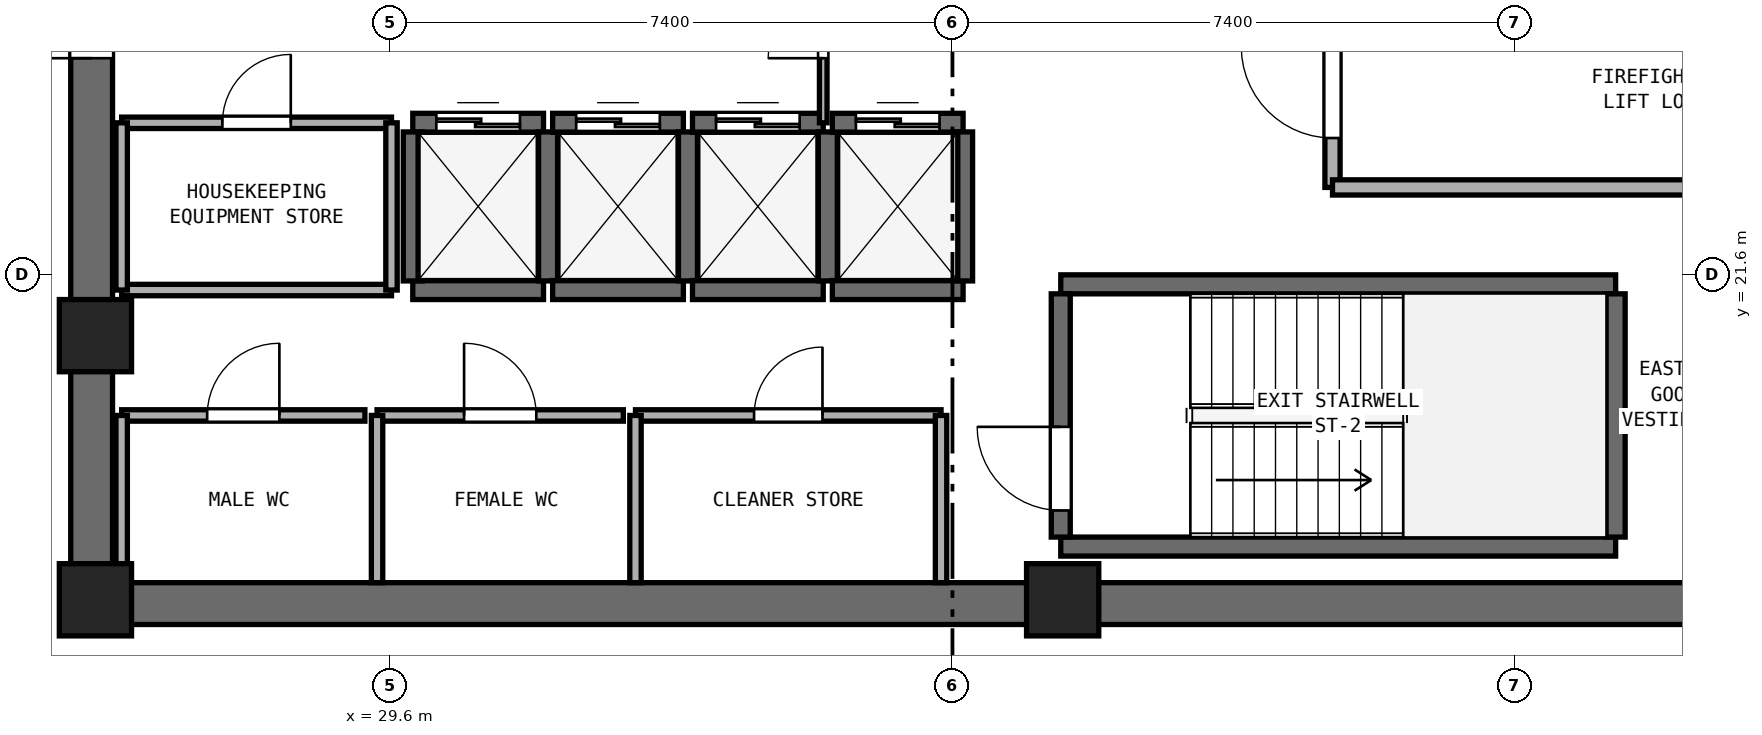
"""IFC4 building model, lengths in metres.
Left out: names, types, materials, properties, quantities, classifications, styles, units other than length and angle.
Written with IfcOpenShell. Run it as: python <this file> out.ifc"""

import sys

from ifc_helpers import new_model, si_unit, direction, frame, frame_2d, origin, origin_2d, place, context, subcontext, project, spatial, rectangle, extrude, element, fill, save


model = new_model("IFC4")
c1 = context("Model", 3, precision=1e-05, world=origin(), true_north=direction((0.0, 1.0)))
c2 = subcontext(c1, "Body", "Model", "MODEL_VIEW")
j1 = project(units=[si_unit("LENGTHUNIT", "METRE"), si_unit("PLANEANGLEUNIT", "RADIAN")], contexts=[c1])
p1 = place(None, origin())
s1 = spatial("IfcSite", under=j1, at=p1, CompositionType="ELEMENT")
p2 = place(p1, origin())
s2 = spatial("IfcBuilding", under=s1, at=p2, CompositionType="ELEMENT")
p3 = place(p2, frame((0.0, 0.0, 216.2)))
s3 = spatial("IfcBuildingStorey", under=s2, at=p3, CompositionType="ELEMENT", Elevation=216.2)
p4 = place(p3, frame((25.4, 17.275, 0.0), z_axis=(0.0, 0.0, 1.0), x_axis=(1.0, 0.0, 0.0)))
e1 = element("IfcWall", 1, at=p4, inside=s3, PredefinedType="SHEAR", context=c2, shape_type="SweptSolid", body=[
    extrude(rectangle(XDim=23.2, YDim=0.55, at=frame_2d((11.6, 0.0))), origin(), (0.0, 0.0, 1.0), 3.4),
])
p5 = place(p3, frame((25.675, 17.55, 0.0), z_axis=(0.0, 0.0, 1.0), x_axis=(0.0, 1.0, 0.0)))
e2 = element("IfcWall", 2, at=p5, inside=s3, PredefinedType="SHEAR", context=c2, shape_type="SweptSolid", body=[
    extrude(rectangle(XDim=15.3, YDim=0.55, at=frame_2d((7.65, 0.0))), origin(), (0.0, 0.0, 1.0), 3.4),
])
p6 = place(p5, frame((6.9, 0.0, 0.0)))
e3 = element("IfcOpeningElement", 3, at=p6, cuts=e2, PredefinedType="OPENING", context=c2, shape_type="SweptSolid", body=[
    extrude(rectangle(XDim=1.5, YDim=2.15, at=frame_2d((0.75, 1.075))), frame((0.0, 0.285, 0.0), z_axis=(0.0, -1.0, 0.0), x_axis=(1.0, 0.0, 0.0)), (0.0, 0.0, 1.0), 0.57),
])
for number, where, z_axis, x_axis in (
    (4, (25.725, 17.325, 0.0), (0.0, 0.0, 1.0), (1.0, 0.0, 0.0)),
    (5, (38.45, 17.325, 0.0), (0.0, 0.0, 1.0), (1.0, 0.0, 0.0)),
    (6, (25.725, 20.8, 0.0), (0.0, 0.0, 1.0), (1.0, 0.0, 0.0)),
):
    element("IfcColumn", number, at=place(p3, frame(where, z_axis=z_axis, x_axis=x_axis)), inside=s3, PredefinedType="PILASTER", context=c2, shape_type="SweptSolid", body=[
        extrude(rectangle(XDim=0.95, YDim=0.95, at=origin_2d()), origin(), (0.0, 0.0, 1.0), 3.8),
    ])
for number, where, z_axis, x_axis in (
    (7, (38.425, 18.025, 0.0), (0.0, 0.0, 1.0), (1.0, 0.0, 0.0)),
    (8, (38.425, 21.475, 0.0), (0.0, 0.0, 1.0), (1.0, 0.0, 0.0)),
):
    element("IfcWall", number, at=place(p3, frame(where, z_axis=z_axis, x_axis=x_axis)), inside=s3, PredefinedType="SHEAR", context=c2, shape_type="SweptSolid", body=[
        extrude(rectangle(XDim=7.3, YDim=0.25, at=frame_2d((3.65, 0.0))), origin(), (0.0, 0.0, 1.0), 3.4),
    ])
p7 = place(p3, frame((38.425, 18.15, 0.0), z_axis=(0.0, 0.0, 1.0), x_axis=(0.0, 1.0, 0.0)))
e9 = element("IfcWall", 9, at=p7, inside=s3, PredefinedType="SHEAR", context=c2, shape_type="SweptSolid", body=[
    extrude(rectangle(XDim=3.2, YDim=0.25, at=frame_2d((1.6, 0.0))), origin(), (0.0, 0.0, 1.0), 3.4),
])
p8 = place(p7, frame((0.35, 0.0, 0.0)))
e10 = element("IfcOpeningElement", 10, at=p8, cuts=e9, PredefinedType="OPENING", context=c2, shape_type="SweptSolid", body=[
    extrude(rectangle(XDim=1.1, YDim=2.15, at=frame_2d((0.55, 1.075))), frame((0.0, 0.135, 0.0), z_axis=(0.0, -1.0, 0.0), x_axis=(1.0, 0.0, 0.0)), (0.0, 0.0, 1.0), 0.27),
])
p9 = place(p3, frame((45.725, 18.15, 0.0), z_axis=(0.0, 0.0, 1.0), x_axis=(0.0, 1.0, 0.0)))
e11 = element("IfcWall", 11, at=p9, inside=s3, PredefinedType="SHEAR", context=c2, shape_type="SweptSolid", body=[
    extrude(rectangle(XDim=3.2, YDim=0.25, at=frame_2d((1.6, 0.0))), origin(), (0.0, 0.0, 1.0), 3.4),
])
p10 = place(p3, frame((29.9, 21.4, 0.0), z_axis=(0.0, 0.0, 1.0), x_axis=(1.0, 0.0, 0.0)))
e12 = element("IfcWall", 12, at=p10, inside=s3, PredefinedType="SHEAR", context=c2, shape_type="SweptSolid", body=[
    extrude(rectangle(XDim=1.72, YDim=0.25, at=frame_2d((0.86, 0.0))), origin(), (0.0, 0.0, 1.0), 3.4),
])
p11 = place(p3, frame((29.9, 23.6, 0.0), z_axis=(0.0, 0.0, 1.0), x_axis=(1.0, 0.0, 0.0)))
e13 = element("IfcWall", 13, at=p11, inside=s3, PredefinedType="SHEAR", context=c2, shape_type="SweptSolid", body=[
    extrude(rectangle(XDim=1.72, YDim=0.25, at=frame_2d((0.86, 0.0))), origin(), (0.0, 0.0, 1.0), 3.4),
])
p12 = place(p11, frame((0.31, 0.0, 0.0)))
e14 = element("IfcOpeningElement", 14, at=p12, cuts=e13, PredefinedType="OPENING", context=c2, shape_type="SweptSolid", body=[
    extrude(rectangle(XDim=1.1, YDim=2.15, at=frame_2d((0.55, 1.075))), frame((0.0, 0.135, 0.0), z_axis=(0.0, -1.0, 0.0), x_axis=(1.0, 0.0, 0.0)), (0.0, 0.0, 1.0), 0.27),
])
for number, where, z_axis, x_axis in (
    (15, (29.9, 21.52, 0.0), (0.0, 0.0, 1.0), (0.0, 1.0, 0.0)),
    (16, (31.68, 21.52, 0.0), (0.0, 0.0, 1.0), (0.0, 1.0, 0.0)),
):
    element("IfcWall", number, at=place(p3, frame(where, z_axis=z_axis, x_axis=x_axis)), inside=s3, PredefinedType="SHEAR", context=c2, shape_type="SweptSolid", body=[
        extrude(rectangle(XDim=1.96, YDim=0.25, at=frame_2d((0.98, 0.0))), origin(), (0.0, 0.0, 1.0), 3.4),
    ])
p13 = place(p3, frame((31.74, 21.4, 0.0), z_axis=(0.0, 0.0, 1.0), x_axis=(1.0, 0.0, 0.0)))
e17 = element("IfcWall", 17, at=p13, inside=s3, PredefinedType="SHEAR", context=c2, shape_type="SweptSolid", body=[
    extrude(rectangle(XDim=1.72, YDim=0.25, at=frame_2d((0.86, 0.0))), origin(), (0.0, 0.0, 1.0), 3.4),
])
p14 = place(p3, frame((31.74, 23.6, 0.0), z_axis=(0.0, 0.0, 1.0), x_axis=(1.0, 0.0, 0.0)))
e18 = element("IfcWall", 18, at=p14, inside=s3, PredefinedType="SHEAR", context=c2, shape_type="SweptSolid", body=[
    extrude(rectangle(XDim=1.72, YDim=0.25, at=frame_2d((0.86, 0.0))), origin(), (0.0, 0.0, 1.0), 3.4),
])
p15 = place(p14, frame((0.31, 0.0, 0.0)))
e19 = element("IfcOpeningElement", 19, at=p15, cuts=e18, PredefinedType="OPENING", context=c2, shape_type="SweptSolid", body=[
    extrude(rectangle(XDim=1.1, YDim=2.15, at=frame_2d((0.55, 1.075))), frame((0.0, 0.135, 0.0), z_axis=(0.0, -1.0, 0.0), x_axis=(1.0, 0.0, 0.0)), (0.0, 0.0, 1.0), 0.27),
])
p16 = place(p3, frame((33.52, 21.52, 0.0), z_axis=(0.0, 0.0, 1.0), x_axis=(0.0, 1.0, 0.0)))
e20 = element("IfcWall", 20, at=p16, inside=s3, PredefinedType="SHEAR", context=c2, shape_type="SweptSolid", body=[
    extrude(rectangle(XDim=1.96, YDim=0.25, at=frame_2d((0.98, 0.0))), origin(), (0.0, 0.0, 1.0), 3.4),
])
p17 = place(p3, frame((33.58, 21.4, 0.0), z_axis=(0.0, 0.0, 1.0), x_axis=(1.0, 0.0, 0.0)))
e21 = element("IfcWall", 21, at=p17, inside=s3, PredefinedType="SHEAR", context=c2, shape_type="SweptSolid", body=[
    extrude(rectangle(XDim=1.72, YDim=0.25, at=frame_2d((0.86, 0.0))), origin(), (0.0, 0.0, 1.0), 3.4),
])
p18 = place(p3, frame((33.58, 23.6, 0.0), z_axis=(0.0, 0.0, 1.0), x_axis=(1.0, 0.0, 0.0)))
e22 = element("IfcWall", 22, at=p18, inside=s3, PredefinedType="SHEAR", context=c2, shape_type="SweptSolid", body=[
    extrude(rectangle(XDim=1.72, YDim=0.25, at=frame_2d((0.86, 0.0))), origin(), (0.0, 0.0, 1.0), 3.4),
])
p19 = place(p18, frame((0.31, 0.0, 0.0)))
e23 = element("IfcOpeningElement", 23, at=p19, cuts=e22, PredefinedType="OPENING", context=c2, shape_type="SweptSolid", body=[
    extrude(rectangle(XDim=1.1, YDim=2.15, at=frame_2d((0.55, 1.075))), frame((0.0, 0.135, 0.0), z_axis=(0.0, -1.0, 0.0), x_axis=(1.0, 0.0, 0.0)), (0.0, 0.0, 1.0), 0.27),
])
p20 = place(p3, frame((35.36, 21.52, 0.0), z_axis=(0.0, 0.0, 1.0), x_axis=(0.0, 1.0, 0.0)))
e24 = element("IfcWall", 24, at=p20, inside=s3, PredefinedType="SHEAR", context=c2, shape_type="SweptSolid", body=[
    extrude(rectangle(XDim=1.96, YDim=0.25, at=frame_2d((0.98, 0.0))), origin(), (0.0, 0.0, 1.0), 3.4),
])
p21 = place(p3, frame((35.42, 21.4, 0.0), z_axis=(0.0, 0.0, 1.0), x_axis=(1.0, 0.0, 0.0)))
e25 = element("IfcWall", 25, at=p21, inside=s3, PredefinedType="SHEAR", context=c2, shape_type="SweptSolid", body=[
    extrude(rectangle(XDim=1.72, YDim=0.25, at=frame_2d((0.86, 0.0))), origin(), (0.0, 0.0, 1.0), 3.4),
])
p22 = place(p3, frame((35.42, 23.6, 0.0), z_axis=(0.0, 0.0, 1.0), x_axis=(1.0, 0.0, 0.0)))
e26 = element("IfcWall", 26, at=p22, inside=s3, PredefinedType="SHEAR", context=c2, shape_type="SweptSolid", body=[
    extrude(rectangle(XDim=1.72, YDim=0.25, at=frame_2d((0.86, 0.0))), origin(), (0.0, 0.0, 1.0), 3.4),
])
p23 = place(p22, frame((0.31, 0.0, 0.0)))
e27 = element("IfcOpeningElement", 27, at=p23, cuts=e26, PredefinedType="OPENING", context=c2, shape_type="SweptSolid", body=[
    extrude(rectangle(XDim=1.1, YDim=2.15, at=frame_2d((0.55, 1.075))), frame((0.0, 0.135, 0.0), z_axis=(0.0, -1.0, 0.0), x_axis=(1.0, 0.0, 0.0)), (0.0, 0.0, 1.0), 0.27),
])
p24 = place(p3, frame((37.14, 21.52, 0.0), z_axis=(0.0, 0.0, 1.0), x_axis=(0.0, 1.0, 0.0)))
e28 = element("IfcWall", 28, at=p24, inside=s3, PredefinedType="SHEAR", context=c2, shape_type="SweptSolid", body=[
    extrude(rectangle(XDim=1.96, YDim=0.25, at=frame_2d((0.98, 0.0))), origin(), (0.0, 0.0, 1.0), 3.4),
])
p25 = place(p3, frame((42.0, 22.75, 0.0), z_axis=(0.0, 0.0, 1.0), x_axis=(0.0, 1.0, 0.0)))
e29 = element("IfcWall", 29, at=p25, inside=s3, PredefinedType="SOLIDWALL", context=c2, shape_type="SweptSolid", body=[
    extrude(rectangle(XDim=6.05, YDim=0.2, at=frame_2d((3.025, 0.0))), origin(), (0.0, 0.0, 1.0), 3.4),
])
p26 = place(p25, frame((0.65, 0.0, 0.0)))
e30 = element("IfcOpeningElement", 30, at=p26, cuts=e29, PredefinedType="OPENING", context=c2, shape_type="SweptSolid", body=[
    extrude(rectangle(XDim=1.2, YDim=2.15, at=frame_2d((0.6, 1.075))), frame((0.0, 0.11, 0.0), z_axis=(0.0, -1.0, 0.0), x_axis=(1.0, 0.0, 0.0)), (0.0, 0.0, 1.0), 0.22),
])
p27 = place(p3, frame((42.0, 22.75, 0.0), z_axis=(0.0, 0.0, 1.0), x_axis=(1.0, 0.0, 0.0)))
e31 = element("IfcWall", 31, at=p27, inside=s3, PredefinedType="SOLIDWALL", context=c2, shape_type="SweptSolid", body=[
    extrude(rectangle(XDim=6.05, YDim=0.2, at=frame_2d((3.025, 0.0))), origin(), (0.0, 0.0, 1.0), 3.4),
])
p28 = place(p3, frame((26.07, 19.75, 0.0), z_axis=(0.0, 0.0, 1.0), x_axis=(1.0, 0.0, 0.0)))
e32 = element("IfcWall", 32, at=p28, inside=s3, PredefinedType="PARTITIONING", context=c2, shape_type="SweptSolid", body=[
    extrude(rectangle(XDim=3.2, YDim=0.15, at=frame_2d((1.6, 0.0))), origin(), (0.0, 0.0, 1.0), 3.4),
])
p29 = place(p28, frame((1.125, 0.0, 0.0)))
e33 = element("IfcOpeningElement", 33, at=p29, cuts=e32, PredefinedType="OPENING", context=c2, shape_type="SweptSolid", body=[
    extrude(rectangle(XDim=0.95, YDim=2.1, at=frame_2d((0.475, 1.05))), frame((0.0, 0.085, 0.0), z_axis=(0.0, -1.0, 0.0), x_axis=(1.0, 0.0, 0.0)), (0.0, 0.0, 1.0), 0.17),
])
p30 = place(p3, frame((26.07, 17.55, 0.0), z_axis=(0.0, 0.0, 1.0), x_axis=(0.0, 1.0, 0.0)))
e34 = element("IfcWall", 34, at=p30, inside=s3, PredefinedType="PARTITIONING", context=c2, shape_type="SweptSolid", body=[
    extrude(rectangle(XDim=2.2, YDim=0.15, at=frame_2d((1.1, 0.0))), origin(), (0.0, 0.0, 1.0), 2.5),
])
p31 = place(p3, frame((29.43, 19.75, 0.0), z_axis=(0.0, 0.0, 1.0), x_axis=(1.0, 0.0, 0.0)))
e35 = element("IfcWall", 35, at=p31, inside=s3, PredefinedType="PARTITIONING", context=c2, shape_type="SweptSolid", body=[
    extrude(rectangle(XDim=3.24, YDim=0.15, at=frame_2d((1.62, 0.0))), origin(), (0.0, 0.0, 1.0), 3.4),
])
p32 = place(p31, frame((1.145, 0.0, 0.0)))
e36 = element("IfcOpeningElement", 36, at=p32, cuts=e35, PredefinedType="OPENING", context=c2, shape_type="SweptSolid", body=[
    extrude(rectangle(XDim=0.95, YDim=2.1, at=frame_2d((0.475, 1.05))), frame((0.0, 0.085, 0.0), z_axis=(0.0, -1.0, 0.0), x_axis=(1.0, 0.0, 0.0)), (0.0, 0.0, 1.0), 0.17),
])
p33 = place(p3, frame((29.43, 17.55, 0.0), z_axis=(0.0, 0.0, 1.0), x_axis=(0.0, 1.0, 0.0)))
e37 = element("IfcWall", 37, at=p33, inside=s3, PredefinedType="PARTITIONING", context=c2, shape_type="SweptSolid", body=[
    extrude(rectangle(XDim=2.2, YDim=0.15, at=frame_2d((1.1, 0.0))), origin(), (0.0, 0.0, 1.0), 3.4),
])
p34 = place(p3, frame((32.83, 19.75, 0.0), z_axis=(0.0, 0.0, 1.0), x_axis=(1.0, 0.0, 0.0)))
e38 = element("IfcWall", 38, at=p34, inside=s3, PredefinedType="PARTITIONING", context=c2, shape_type="SweptSolid", body=[
    extrude(rectangle(XDim=4.02, YDim=0.15, at=frame_2d((2.01, 0.0))), origin(), (0.0, 0.0, 1.0), 3.4),
])
p35 = place(p34, frame((1.56, 0.0, 0.0)))
e39 = element("IfcOpeningElement", 39, at=p35, cuts=e38, PredefinedType="OPENING", context=c2, shape_type="SweptSolid", body=[
    extrude(rectangle(XDim=0.9, YDim=2.1, at=frame_2d((0.45, 1.05))), frame((0.0, 0.085, 0.0), z_axis=(0.0, -1.0, 0.0), x_axis=(1.0, 0.0, 0.0)), (0.0, 0.0, 1.0), 0.17),
])
for number, where, z_axis, x_axis in (
    (40, (32.83, 17.55, 0.0), (0.0, 0.0, 1.0), (0.0, 1.0, 0.0)),
    (41, (36.85, 17.55, 0.0), (0.0, 0.0, 1.0), (0.0, 1.0, 0.0)),
):
    element("IfcWall", number, at=place(p3, frame(where, z_axis=z_axis, x_axis=x_axis)), inside=s3, PredefinedType="PARTITIONING", context=c2, shape_type="SweptSolid", body=[
        extrude(rectangle(XDim=2.2, YDim=0.15, at=frame_2d((1.1, 0.0))), origin(), (0.0, 0.0, 1.0), 3.4),
    ])
p36 = place(p3, frame((26.07, 21.4, 0.0), z_axis=(0.0, 0.0, 1.0), x_axis=(1.0, 0.0, 0.0)))
e42 = element("IfcWall", 42, at=p36, inside=s3, PredefinedType="PARTITIONING", context=c2, shape_type="SweptSolid", body=[
    extrude(rectangle(XDim=3.55, YDim=0.15, at=frame_2d((1.775, 0.0))), origin(), (0.0, 0.0, 1.0), 3.4),
])
p37 = place(p3, frame((26.07, 23.6, 0.0), z_axis=(0.0, 0.0, 1.0), x_axis=(1.0, 0.0, 0.0)))
e43 = element("IfcWall", 43, at=p37, inside=s3, PredefinedType="PARTITIONING", context=c2, shape_type="SweptSolid", body=[
    extrude(rectangle(XDim=3.55, YDim=0.15, at=frame_2d((1.775, 0.0))), origin(), (0.0, 0.0, 1.0), 3.4),
])
p38 = place(p37, frame((1.325, 0.0, 0.0)))
e44 = element("IfcOpeningElement", 44, at=p38, cuts=e43, PredefinedType="OPENING", context=c2, shape_type="SweptSolid", body=[
    extrude(rectangle(XDim=0.9, YDim=2.1, at=frame_2d((0.45, 1.05))), frame((0.0, 0.085, 0.0), z_axis=(0.0, -1.0, 0.0), x_axis=(1.0, 0.0, 0.0)), (0.0, 0.0, 1.0), 0.17),
])
p39 = place(p3, frame((26.07, 21.4, 0.0), z_axis=(0.0, 0.0, 1.0), x_axis=(0.0, 1.0, 0.0)))
e45 = element("IfcWall", 45, at=p39, inside=s3, PredefinedType="PARTITIONING", context=c2, shape_type="SweptSolid", body=[
    extrude(rectangle(XDim=2.2, YDim=0.15, at=frame_2d((1.1, 0.0))), origin(), (0.0, 0.0, 1.0), 2.5),
])
p40 = place(p3, frame((29.62, 21.4, 0.0), z_axis=(0.0, 0.0, 1.0), x_axis=(0.0, 1.0, 0.0)))
e46 = element("IfcWall", 46, at=p40, inside=s3, PredefinedType="PARTITIONING", context=c2, shape_type="SweptSolid", body=[
    extrude(rectangle(XDim=2.2, YDim=0.15, at=frame_2d((1.1, 0.0))), origin(), (0.0, 0.0, 1.0), 3.4),
])
p41 = place(p3, frame((35.3, 23.6, 0.0), z_axis=(0.0, 0.0, 1.0), x_axis=(0.0, 1.0, 0.0)))
e47 = element("IfcWall", 47, at=p41, inside=s3, PredefinedType="PARTITIONING", context=c2, shape_type="SweptSolid", body=[
    extrude(rectangle(XDim=3.2, YDim=0.1, at=frame_2d((1.6, 0.0))), origin(), (0.0, 0.0, 1.0), 3.4),
])
p42 = place(p41, frame((0.85, 0.0, 0.0)))
e48 = element("IfcOpeningElement", 48, at=p42, cuts=e47, PredefinedType="OPENING", context=c2, shape_type="SweptSolid", body=[
    extrude(rectangle(XDim=1.45, YDim=2.12, at=frame_2d((0.725, 1.06))), frame((0.0, 0.06, 0.0), z_axis=(0.0, -1.0, 0.0), x_axis=(1.0, 0.0, 0.0)), (0.0, 0.0, 1.0), 0.12),
])
p43 = place(p8, origin())
e49 = element("IfcDoor", 49, at=p43, inside=s3, OperationType="SINGLE_SWING_RIGHT", PredefinedType="DOOR", context=c2, shape_type="SweptSolid", body=[
    extrude(rectangle(XDim=1.1, YDim=2.15, at=frame_2d((0.55, 1.075))), frame((0.0, 0.025, 0.0), z_axis=(0.0, -1.0, 0.0), x_axis=(1.0, 0.0, 0.0)), (0.0, 0.0, 1.0), 0.05),
])
fill(e10, e49)
p44 = place(p12, origin())
e50 = element("IfcDoor", 50, at=p44, inside=s3, OperationType="DOUBLE_DOOR_SLIDING", PredefinedType="DOOR", context=c2, shape_type="SweptSolid", body=[
    extrude(rectangle(XDim=1.1, YDim=2.15, at=frame_2d((0.55, 1.075))), frame((0.0, 0.025, 0.0), z_axis=(0.0, -1.0, 0.0), x_axis=(1.0, 0.0, 0.0)), (0.0, 0.0, 1.0), 0.05),
])
fill(e14, e50)
p45 = place(p15, origin())
e51 = element("IfcDoor", 51, at=p45, inside=s3, OperationType="DOUBLE_DOOR_SLIDING", PredefinedType="DOOR", context=c2, shape_type="SweptSolid", body=[
    extrude(rectangle(XDim=1.1, YDim=2.15, at=frame_2d((0.55, 1.075))), frame((0.0, 0.025, 0.0), z_axis=(0.0, -1.0, 0.0), x_axis=(1.0, 0.0, 0.0)), (0.0, 0.0, 1.0), 0.05),
])
fill(e19, e51)
p46 = place(p19, origin())
e52 = element("IfcDoor", 52, at=p46, inside=s3, OperationType="DOUBLE_DOOR_SLIDING", PredefinedType="DOOR", context=c2, shape_type="SweptSolid", body=[
    extrude(rectangle(XDim=1.1, YDim=2.15, at=frame_2d((0.55, 1.075))), frame((0.0, 0.025, 0.0), z_axis=(0.0, -1.0, 0.0), x_axis=(1.0, 0.0, 0.0)), (0.0, 0.0, 1.0), 0.05),
])
fill(e23, e52)
p47 = place(p23, origin())
e53 = element("IfcDoor", 53, at=p47, inside=s3, OperationType="DOUBLE_DOOR_SLIDING", PredefinedType="DOOR", context=c2, shape_type="SweptSolid", body=[
    extrude(rectangle(XDim=1.1, YDim=2.15, at=frame_2d((0.55, 1.075))), frame((0.0, 0.025, 0.0), z_axis=(0.0, -1.0, 0.0), x_axis=(1.0, 0.0, 0.0)), (0.0, 0.0, 1.0), 0.05),
])
fill(e27, e53)
p48 = place(p26, origin())
e54 = element("IfcDoor", 54, at=p48, inside=s3, OperationType="SINGLE_SWING_RIGHT", PredefinedType="DOOR", context=c2, shape_type="SweptSolid", body=[
    extrude(rectangle(XDim=1.2, YDim=2.15, at=frame_2d((0.6, 1.075))), frame((0.0, 0.025, 0.0), z_axis=(0.0, -1.0, 0.0), x_axis=(1.0, 0.0, 0.0)), (0.0, 0.0, 1.0), 0.05),
])
fill(e30, e54)
p49 = place(p6, origin())
e55 = element("IfcDoor", 55, at=p49, inside=s3, OperationType="DOUBLE_DOOR_SINGLE_SWING", PredefinedType="DOOR", context=c2, shape_type="SweptSolid", body=[
    extrude(rectangle(XDim=1.5, YDim=2.15, at=frame_2d((0.75, 1.075))), frame((0.0, 0.025, 0.0), z_axis=(0.0, -1.0, 0.0), x_axis=(1.0, 0.0, 0.0)), (0.0, 0.0, 1.0), 0.05),
])
fill(e3, e55)
p50 = place(p29, origin())
e56 = element("IfcDoor", 56, at=p50, inside=s3, OperationType="SINGLE_SWING_RIGHT", PredefinedType="DOOR", context=c2, shape_type="SweptSolid", body=[
    extrude(rectangle(XDim=0.95, YDim=2.1, at=frame_2d((0.475, 1.05))), frame((0.0, 0.025, 0.0), z_axis=(0.0, -1.0, 0.0), x_axis=(1.0, 0.0, 0.0)), (0.0, 0.0, 1.0), 0.05),
])
fill(e33, e56)
p51 = place(p32, origin())
e57 = element("IfcDoor", 57, at=p51, inside=s3, OperationType="SINGLE_SWING_LEFT", PredefinedType="DOOR", context=c2, shape_type="SweptSolid", body=[
    extrude(rectangle(XDim=0.95, YDim=2.1, at=frame_2d((0.475, 1.05))), frame((0.0, 0.025, 0.0), z_axis=(0.0, -1.0, 0.0), x_axis=(1.0, 0.0, 0.0)), (0.0, 0.0, 1.0), 0.05),
])
fill(e36, e57)
p52 = place(p35, origin())
e58 = element("IfcDoor", 58, at=p52, inside=s3, OperationType="SINGLE_SWING_RIGHT", PredefinedType="DOOR", context=c2, shape_type="SweptSolid", body=[
    extrude(rectangle(XDim=0.9, YDim=2.1, at=frame_2d((0.45, 1.05))), frame((0.0, 0.025, 0.0), z_axis=(0.0, -1.0, 0.0), x_axis=(1.0, 0.0, 0.0)), (0.0, 0.0, 1.0), 0.05),
])
fill(e39, e58)
p53 = place(p38, origin())
e59 = element("IfcDoor", 59, at=p53, inside=s3, OperationType="SINGLE_SWING_RIGHT", PredefinedType="DOOR", context=c2, shape_type="SweptSolid", body=[
    extrude(rectangle(XDim=0.9, YDim=2.1, at=frame_2d((0.45, 1.05))), frame((0.0, 0.025, 0.0), z_axis=(0.0, -1.0, 0.0), x_axis=(1.0, 0.0, 0.0)), (0.0, 0.0, 1.0), 0.05),
])
fill(e44, e59)
p54 = place(p42, origin())
e60 = element("IfcDoor", 60, at=p54, inside=s3, OperationType="DOUBLE_DOOR_SINGLE_SWING", PredefinedType="DOOR", context=c2, shape_type="SweptSolid", body=[
    extrude(rectangle(XDim=1.45, YDim=2.12, at=frame_2d((0.725, 1.06))), frame((0.0, 0.025, 0.0), z_axis=(0.0, -1.0, 0.0), x_axis=(1.0, 0.0, 0.0)), (0.0, 0.0, 1.0), 0.05),
])
fill(e48, e60)
save(model, sys.argv[1])
